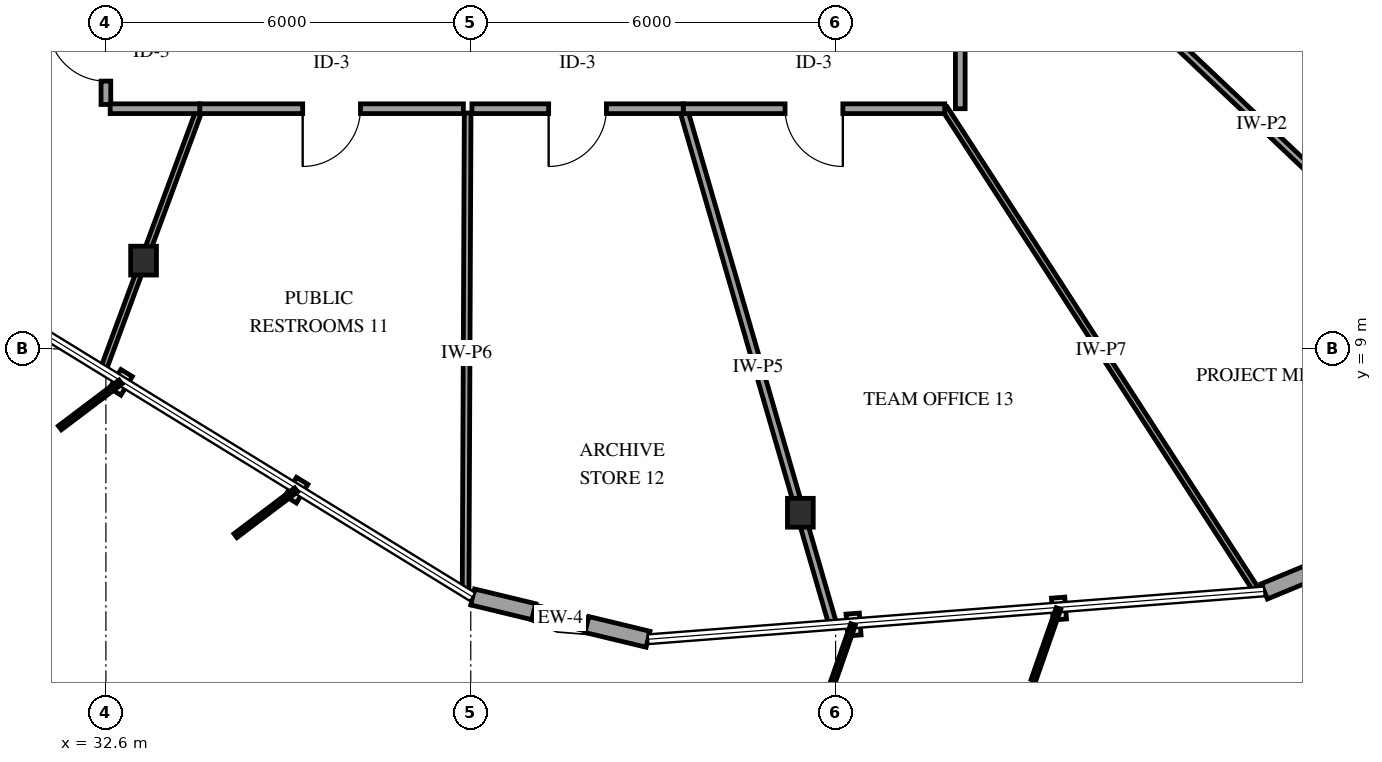
"""IFC4 building model, lengths in metres.
Left out: names, types, materials, properties, quantities, classifications, styles, units other than length and angle.
Written with IfcOpenShell. Run it as: python <this file> out.ifc"""

import sys

from ifc_helpers import new_model, si_unit, direction, frame, frame_2d, origin, origin_2d, place, context, subcontext, project, spatial, rectangle, i_section, extrude, element, fill, save


model = new_model("IFC4")
c1 = context("Model", 3, precision=1e-05, world=origin(), true_north=direction((0.0, 1.0)))
c2 = subcontext(c1, "Body", "Model", "MODEL_VIEW")
j1 = project(units=[si_unit("LENGTHUNIT", "METRE"), si_unit("PLANEANGLEUNIT", "RADIAN")], contexts=[c1])
p1 = place(None, origin())
s1 = spatial("IfcSite", under=j1, at=p1, CompositionType="ELEMENT")
p2 = place(p1, origin())
s2 = spatial("IfcBuilding", under=s1, at=p2, CompositionType="ELEMENT")
p3 = place(p2, frame((0.0, 0.0, 50.6)))
s3 = spatial("IfcBuildingStorey", under=s2, at=p3, CompositionType="ELEMENT", Elevation=50.6)
for number, where, z_axis, x_axis in (
    (1, (33.219, 10.452, 0.0), (0.0, 0.0, 1.0), (1.0, 0.0, 0.0)),
    (2, (44.02, 6.306, 0.0), (0.0, 0.0, 1.0), (1.0, 0.0, 0.0)),
):
    element("IfcColumn", number, at=place(p3, frame(where, z_axis=z_axis, x_axis=x_axis)), inside=s3, PredefinedType="COLUMN", context=c2, shape_type="SweptSolid", body=[
        extrude(i_section(OverallWidth=0.424, OverallDepth=0.474, WebThickness=0.048, FlangeThickness=0.077, FilletRadius=0.038, at=origin_2d()), origin(), (0.0, 0.0, 1.0), 4.0),
    ])
p4 = place(p3, frame((38.631, 4.921, 0.0), z_axis=(0.0, 0.0, 1.0), x_axis=(0.972104212083, -0.234549356962, 0.0)))
e3 = element("IfcWall", 3, at=p4, inside=s3, PredefinedType="SOLIDWALL", context=c2, shape_type="SweptSolid", body=[
    extrude(rectangle(XDim=2.967, YDim=0.27, at=frame_2d((1.483, 0.0))), origin(), (0.0, 0.0, 1.0), 3.079),
])
p5 = place(p4, frame((1.033, 0.0, 0.75)))
e4 = element("IfcOpeningElement", 4, at=p5, cuts=e3, PredefinedType="OPENING", context=c2, shape_type="SweptSolid", body=[
    extrude(rectangle(XDim=0.9, YDim=1.5, at=frame_2d((0.45, 0.75))), frame((0.0, 0.145, 0.0), z_axis=(0.0, -1.0, 0.0), x_axis=(1.0, 0.0, 0.0)), (0.0, 0.0, 1.0), 0.29),
])
p6 = place(p3, frame((51.65, 5.012, 0.0), z_axis=(0.0, 0.0, 1.0), x_axis=(0.924287306496, 0.381697491544, 0.0)))
e5 = element("IfcWall", 5, at=p6, inside=s3, PredefinedType="SOLIDWALL", context=c2, shape_type="SweptSolid", body=[
    extrude(rectangle(XDim=2.967, YDim=0.27, at=frame_2d((1.483, 0.0))), origin(), (0.0, 0.0, 1.0), 3.079),
])
p7 = place(p6, frame((1.033, 0.0, 0.75)))
e6 = element("IfcOpeningElement", 6, at=p7, cuts=e5, PredefinedType="OPENING", context=c2, shape_type="SweptSolid", body=[
    extrude(rectangle(XDim=0.9, YDim=1.5, at=frame_2d((0.45, 0.75))), frame((0.0, 0.145, 0.0), z_axis=(0.0, -1.0, 0.0), x_axis=(1.0, 0.0, 0.0)), (0.0, 0.0, 1.0), 0.29),
])
p8 = place(p3, frame((46.65, 20.689, 0.0), z_axis=(0.0, 0.0, 1.0), x_axis=(0.881605315222, -0.471987360182, 0.0)))
e7 = element("IfcWall", 7, at=p8, inside=s3, PredefinedType="PARTITIONING", context=c2, shape_type="SweptSolid", body=[
    extrude(rectangle(XDim=17.282, YDim=0.14, at=frame_2d((8.641, 0.0))), origin(), (0.0, 0.0, 1.0), 3.078),
])
p9 = place(p3, frame((46.65, 17.385, 0.0), z_axis=(0.0, 0.0, 1.0), x_axis=(0.726395560774, -0.68727686509, 0.0)))
e8 = element("IfcWall", 8, at=p9, inside=s3, PredefinedType="PARTITIONING", context=c2, shape_type="SweptSolid", body=[
    extrude(rectangle(XDim=13.655, YDim=0.12, at=frame_2d((6.828, 0.0))), origin(), (0.0, 0.0, 1.0), 2.995),
])
p10 = place(p3, frame((46.395, 12.95, 0.0), z_axis=(0.0, 0.0, 1.0), x_axis=(0.54324379199, -0.839575001095, 0.0)))
e9 = element("IfcWall", 9, at=p10, inside=s3, PredefinedType="PARTITIONING", context=c2, shape_type="SweptSolid", body=[
    extrude(rectangle(XDim=9.466, YDim=0.1, at=frame_2d((4.733, 0.0))), origin(), (0.0, 0.0, 1.0), 3.078),
])
p11 = place(p3, frame((42.094, 12.95, 0.0), z_axis=(0.0, 0.0, 1.0), x_axis=(0.2785348965, -0.960426109303, 0.0)))
e10 = element("IfcWall", 10, at=p11, inside=s3, PredefinedType="PARTITIONING", context=c2, shape_type="SweptSolid", body=[
    extrude(rectangle(XDim=8.839, YDim=0.13, at=frame_2d((4.419, 0.0))), origin(), (0.0, 0.0, 1.0), 2.995),
])
p12 = place(p3, frame((38.549, 12.88, 0.0), z_axis=(0.0, 0.0, 1.0), x_axis=(-0.004333117264, -0.999990612003, 0.0)))
e11 = element("IfcWall", 11, at=p12, inside=s3, PredefinedType="PARTITIONING", context=c2, shape_type="SweptSolid", body=[
    extrude(rectangle(XDim=7.888, YDim=0.11, at=frame_2d((3.944, 0.0))), origin(), (0.0, 0.0, 1.0), 3.078),
])
p13 = place(p3, frame((34.143, 12.95, 0.0), z_axis=(0.0, 0.0, 1.0), x_axis=(-0.346937618719, -0.93788820694, 0.0)))
e12 = element("IfcWall", 12, at=p13, inside=s3, PredefinedType="PARTITIONING", context=c2, shape_type="SweptSolid", body=[
    extrude(rectangle(XDim=4.58, YDim=0.1, at=frame_2d((2.29, 0.0))), origin(), (0.0, 0.0, 1.0), 2.995),
])
p14 = place(p3, frame((46.65, 17.385, 0.0), z_axis=(0.0, 0.0, 1.0), x_axis=(0.0, -1.0, 0.0)))
e13 = element("IfcWall", 13, at=p14, inside=s3, PredefinedType="PARTITIONING", context=c2, shape_type="SweptSolid", body=[
    extrude(rectangle(XDim=4.435, YDim=0.16, at=frame_2d((2.218, 0.0))), origin(), (0.0, 0.0, 1.0), 3.7),
])
p15 = place(p14, frame((1.743, 0.0, 0.0)))
e14 = element("IfcOpeningElement", 14, at=p15, cuts=e13, PredefinedType="OPENING", context=c2, shape_type="SweptSolid", body=[
    extrude(rectangle(XDim=0.95, YDim=2.15, at=frame_2d((0.475, 1.075))), frame((0.0, 0.09, 0.0), z_axis=(0.0, -1.0, 0.0), x_axis=(1.0, 0.0, 0.0)), (0.0, 0.0, 1.0), 0.18),
])
p16 = place(p3, frame((38.479, 12.95, 0.0), z_axis=(0.0, 0.0, 1.0), x_axis=(-1.0, 0.0, 0.0)))
e15 = element("IfcWall", 15, at=p16, inside=s3, PredefinedType="PARTITIONING", context=c2, shape_type="SweptSolid", body=[
    extrude(rectangle(XDim=4.336, YDim=0.16, at=frame_2d((2.168, 0.0))), origin(), (0.0, 0.0, 1.0), 3.7),
])
p17 = place(p16, frame((1.693, 0.0, 0.0)))
e16 = element("IfcOpeningElement", 16, at=p17, cuts=e15, PredefinedType="OPENING", context=c2, shape_type="SweptSolid", body=[
    extrude(rectangle(XDim=0.95, YDim=2.15, at=frame_2d((0.475, 1.075))), frame((0.0, 0.09, 0.0), z_axis=(0.0, -1.0, 0.0), x_axis=(1.0, 0.0, 0.0)), (0.0, 0.0, 1.0), 0.18),
])
p18 = place(p3, frame((46.395, 12.95, 0.0), z_axis=(0.0, 0.0, 1.0), x_axis=(-1.0, 0.0, 0.0)))
e17 = element("IfcWall", 17, at=p18, inside=s3, PredefinedType="PARTITIONING", context=c2, shape_type="SweptSolid", body=[
    extrude(rectangle(XDim=4.301, YDim=0.16, at=frame_2d((2.15, 0.0))), origin(), (0.0, 0.0, 1.0), 3.7),
])
p19 = place(p18, frame((1.676, 0.0, 0.0)))
e18 = element("IfcOpeningElement", 18, at=p19, cuts=e17, PredefinedType="OPENING", context=c2, shape_type="SweptSolid", body=[
    extrude(rectangle(XDim=0.95, YDim=2.15, at=frame_2d((0.475, 1.075))), frame((0.0, 0.09, 0.0), z_axis=(0.0, -1.0, 0.0), x_axis=(1.0, 0.0, 0.0)), (0.0, 0.0, 1.0), 0.18),
])
p20 = place(p3, frame((42.094, 12.95, 0.0), z_axis=(0.0, 0.0, 1.0), x_axis=(-1.0, 0.0, 0.0)))
e19 = element("IfcWall", 19, at=p20, inside=s3, PredefinedType="PARTITIONING", context=c2, shape_type="SweptSolid", body=[
    extrude(rectangle(XDim=3.475, YDim=0.16, at=frame_2d((1.738, 0.0))), origin(), (0.0, 0.0, 1.0), 3.7),
])
p21 = place(p20, frame((1.263, 0.0, 0.0)))
e20 = element("IfcOpeningElement", 20, at=p21, cuts=e19, PredefinedType="OPENING", context=c2, shape_type="SweptSolid", body=[
    extrude(rectangle(XDim=0.95, YDim=2.15, at=frame_2d((0.475, 1.075))), frame((0.0, 0.09, 0.0), z_axis=(0.0, -1.0, 0.0), x_axis=(1.0, 0.0, 0.0)), (0.0, 0.0, 1.0), 0.18),
])
p22 = place(p3, frame((32.6, 13.02, 0.0), z_axis=(0.0, 0.0, 1.0), x_axis=(0.0, 1.0, 0.0)))
e21 = element("IfcWall", 21, at=p22, inside=s3, PredefinedType="PARTITIONING", context=c2, shape_type="SweptSolid", body=[
    extrude(rectangle(XDim=1.91, YDim=0.16, at=frame_2d((0.955, 0.0))), origin(), (0.0, 0.0, 1.0), 3.7),
])
p23 = place(p22, frame((0.384, 0.0, 0.0)))
e22 = element("IfcOpeningElement", 22, at=p23, cuts=e21, PredefinedType="OPENING", context=c2, shape_type="SweptSolid", body=[
    extrude(rectangle(XDim=0.95, YDim=2.15, at=frame_2d((0.475, 1.075))), frame((0.0, 0.09, 0.0), z_axis=(0.0, -1.0, 0.0), x_axis=(1.0, 0.0, 0.0)), (0.0, 0.0, 1.0), 0.18),
])
p24 = place(p3, frame((34.143, 12.95, 0.0), z_axis=(0.0, 0.0, 1.0), x_axis=(-1.0, 0.0, 0.0)))
e23 = element("IfcWall", 23, at=p24, inside=s3, PredefinedType="PARTITIONING", context=c2, shape_type="SweptSolid", body=[
    extrude(rectangle(XDim=1.473, YDim=0.16, at=frame_2d((0.737, 0.0))), origin(), (0.0, 0.0, 1.0), 3.7),
])
p25 = place(p5, origin())
e24 = element("IfcWindow", 24, at=p25, inside=s3, PartitioningType="SINGLE_PANEL", PredefinedType="WINDOW", context=c2, shape_type="SweptSolid", body=[
    extrude(rectangle(XDim=0.9, YDim=1.5, at=frame_2d((0.45, 0.75))), frame((0.0, 0.03, 0.0), z_axis=(0.0, -1.0, 0.0), x_axis=(1.0, 0.0, 0.0)), (0.0, 0.0, 1.0), 0.06),
])
fill(e4, e24)
p26 = place(p17, origin())
e25 = element("IfcDoor", 25, at=p26, inside=s3, OperationType="SINGLE_SWING_RIGHT", PredefinedType="DOOR", context=c2, shape_type="SweptSolid", body=[
    extrude(rectangle(XDim=0.95, YDim=2.15, at=frame_2d((0.475, 1.075))), frame((0.0, 0.025, 0.0), z_axis=(0.0, -1.0, 0.0), x_axis=(1.0, 0.0, 0.0)), (0.0, 0.0, 1.0), 0.05),
])
fill(e16, e25)
p27 = place(p19, origin())
e26 = element("IfcDoor", 26, at=p27, inside=s3, OperationType="SINGLE_SWING_LEFT", PredefinedType="DOOR", context=c2, shape_type="SweptSolid", body=[
    extrude(rectangle(XDim=0.95, YDim=2.15, at=frame_2d((0.475, 1.075))), frame((0.0, 0.025, 0.0), z_axis=(0.0, -1.0, 0.0), x_axis=(1.0, 0.0, 0.0)), (0.0, 0.0, 1.0), 0.05),
])
fill(e18, e26)
p28 = place(p21, origin())
e27 = element("IfcDoor", 27, at=p28, inside=s3, OperationType="SINGLE_SWING_RIGHT", PredefinedType="DOOR", context=c2, shape_type="SweptSolid", body=[
    extrude(rectangle(XDim=0.95, YDim=2.15, at=frame_2d((0.475, 1.075))), frame((0.0, 0.025, 0.0), z_axis=(0.0, -1.0, 0.0), x_axis=(1.0, 0.0, 0.0)), (0.0, 0.0, 1.0), 0.05),
])
fill(e20, e27)
p29 = place(p23, origin())
e28 = element("IfcDoor", 28, at=p29, inside=s3, OperationType="SINGLE_SWING_RIGHT", PredefinedType="DOOR", context=c2, shape_type="SweptSolid", body=[
    extrude(rectangle(XDim=0.95, YDim=2.15, at=frame_2d((0.475, 1.075))), frame((0.0, 0.025, 0.0), z_axis=(0.0, -1.0, 0.0), x_axis=(1.0, 0.0, 0.0)), (0.0, 0.0, 1.0), 0.05),
])
fill(e22, e28)
save(model, sys.argv[1])
